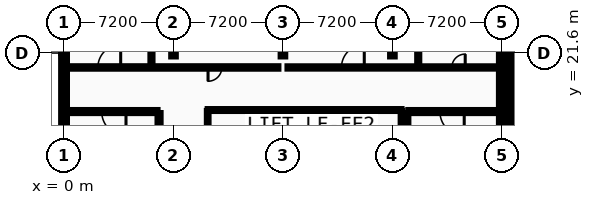
"""IFC4 building model, lengths in metres.
Left out: names, types, materials, properties, quantities, classifications, styles, units other than length and angle.
Written with IfcOpenShell. Run it as: python <this file> out.ifc"""

import sys

from ifc_helpers import new_model, si_unit, direction, frame, frame_2d, origin, origin_2d, place, context, subcontext, project, spatial, rectangle, i_section, extrude, element, fill, save


model = new_model("IFC4")
c1 = context("Model", 3, precision=1e-05, world=origin(), true_north=direction((0.0, 1.0)))
c2 = subcontext(c1, "Body", "Model", "MODEL_VIEW")
j1 = project(units=[si_unit("LENGTHUNIT", "METRE"), si_unit("PLANEANGLEUNIT", "RADIAN")], contexts=[c1])
p1 = place(None, origin())
s1 = spatial("IfcSite", under=j1, at=p1, CompositionType="ELEMENT")
p2 = place(p1, origin())
s2 = spatial("IfcBuilding", under=s1, at=p2, CompositionType="ELEMENT")
p3 = place(p2, frame((0.0, 0.0, 9.6)))
s3 = spatial("IfcBuildingStorey", under=s2, at=p3, CompositionType="ELEMENT", Elevation=9.6)
for number, where, z_axis, x_axis in (
    (1, (0.0, 21.6, 0.0), (0.0, 0.0, 1.0), (1.0, 0.0, 0.0)),
    (2, (7.2, 21.6, 0.0), (0.0, 0.0, 1.0), (1.0, 0.0, 0.0)),
    (3, (14.4, 21.6, 0.0), (0.0, 0.0, 1.0), (1.0, 0.0, 0.0)),
    (4, (21.6, 21.6, 0.0), (0.0, 0.0, 1.0), (1.0, 0.0, 0.0)),
    (5, (28.8, 21.6, 0.0), (0.0, 0.0, 1.0), (1.0, 0.0, 0.0)),
):
    element("IfcColumn", number, at=place(p3, frame(where, z_axis=z_axis, x_axis=x_axis)), inside=s3, PredefinedType="COLUMN", context=c2, shape_type="SweptSolid", body=[
        extrude(i_section(OverallWidth=0.3, OverallDepth=0.45, WebThickness=0.014, FlangeThickness=0.026, FilletRadius=0.027, at=origin_2d()), origin(), (0.0, 0.0, 1.0), 4.4),
    ])
p4 = place(p3, frame((29.52, 21.6, 0.0), z_axis=(0.0, 0.0, 1.0), x_axis=(1.0, 0.0, 0.0)))
e6 = element("IfcColumn", 6, at=p4, inside=s3, PredefinedType="COLUMN", context=c2, shape_type="SweptSolid", body=[
    extrude(i_section(OverallWidth=0.3, OverallDepth=0.36, WebThickness=0.012, FlangeThickness=0.022, FilletRadius=0.027, at=origin_2d()), origin(), (0.0, 0.0, 1.0), 4.4),
])
p5 = place(p3, frame((0.0, 21.6, 0.0), z_axis=(0.0, 0.0, 1.0), x_axis=(0.0, -1.0, 0.0)))
e7 = element("IfcWall", 7, at=p5, inside=s3, PredefinedType="STANDARD", context=c2, shape_type="SweptSolid", body=[
    extrude(rectangle(XDim=7.15, YDim=0.38, at=frame_2d((3.575, 0.0))), origin(), (0.0, 0.0, 1.0), 4.2),
])
p6 = place(p5, frame((1.715, 0.0, 0.95)))
e8 = element("IfcOpeningElement", 8, at=p6, cuts=e7, PredefinedType="OPENING", context=c2, shape_type="SweptSolid", body=[
    extrude(rectangle(XDim=0.86, YDim=1.332, at=frame_2d((0.43, 0.666))), frame((0.0, 0.2, 0.0), z_axis=(0.0, -1.0, 0.0), x_axis=(1.0, 0.0, 0.0)), (0.0, 0.0, 1.0), 0.4),
])
p7 = place(p5, frame((4.575, 0.0, 0.95)))
e9 = element("IfcOpeningElement", 9, at=p7, cuts=e7, PredefinedType="OPENING", context=c2, shape_type="SweptSolid", body=[
    extrude(rectangle(XDim=0.86, YDim=1.332, at=frame_2d((0.43, 0.666))), frame((0.0, 0.2, 0.0), z_axis=(0.0, -1.0, 0.0), x_axis=(1.0, 0.0, 0.0)), (0.0, 0.0, 1.0), 0.4),
])
p8 = place(p3, frame((0.0, 28.8, 0.0), z_axis=(0.0, 0.0, 1.0), x_axis=(0.0, -1.0, 0.0)))
e10 = element("IfcWall", 10, at=p8, inside=s3, PredefinedType="STANDARD", context=c2, shape_type="SweptSolid", body=[
    extrude(rectangle(XDim=7.2, YDim=0.38, at=frame_2d((3.6, 0.0))), origin(), (0.0, 0.0, 1.0), 3.885),
])
p9 = place(p8, frame((1.713, 0.0, 0.95)))
e11 = element("IfcOpeningElement", 11, at=p9, cuts=e10, PredefinedType="OPENING", context=c2, shape_type="SweptSolid", body=[
    extrude(rectangle(XDim=0.894, YDim=1.332, at=frame_2d((0.447, 0.666))), frame((0.0, 0.2, 0.0), z_axis=(0.0, -1.0, 0.0), x_axis=(1.0, 0.0, 0.0)), (0.0, 0.0, 1.0), 0.4),
])
p10 = place(p8, frame((4.593, 0.0, 0.95)))
e12 = element("IfcOpeningElement", 12, at=p10, cuts=e10, PredefinedType="OPENING", context=c2, shape_type="SweptSolid", body=[
    extrude(rectangle(XDim=0.894, YDim=1.332, at=frame_2d((0.447, 0.666))), frame((0.0, 0.2, 0.0), z_axis=(0.0, -1.0, 0.0), x_axis=(1.0, 0.0, 0.0)), (0.0, 0.0, 1.0), 0.4),
])
p11 = place(p3, frame((28.8, 14.45, 0.0), z_axis=(0.0, 0.0, 1.0), x_axis=(0.0, 1.0, 0.0)))
e13 = element("IfcWall", 13, at=p11, inside=s3, PredefinedType="STANDARD", context=c2, shape_type="SweptSolid", body=[
    extrude(rectangle(XDim=7.15, YDim=0.38, at=frame_2d((3.575, 0.0))), origin(), (0.0, 0.0, 1.0), 4.2),
])
p12 = place(p11, frame((1.613, 0.0, 0.95)))
e14 = element("IfcOpeningElement", 14, at=p12, cuts=e13, PredefinedType="OPENING", context=c2, shape_type="SweptSolid", body=[
    extrude(rectangle(XDim=1.064, YDim=1.332, at=frame_2d((0.532, 0.666))), frame((0.0, 0.2, 0.0), z_axis=(0.0, -1.0, 0.0), x_axis=(1.0, 0.0, 0.0)), (0.0, 0.0, 1.0), 0.4),
])
p13 = place(p11, frame((4.473, 0.0, 0.95)))
e15 = element("IfcOpeningElement", 15, at=p13, cuts=e13, PredefinedType="OPENING", context=c2, shape_type="SweptSolid", body=[
    extrude(rectangle(XDim=1.064, YDim=1.332, at=frame_2d((0.532, 0.666))), frame((0.0, 0.2, 0.0), z_axis=(0.0, -1.0, 0.0), x_axis=(1.0, 0.0, 0.0)), (0.0, 0.0, 1.0), 0.4),
])
p14 = place(p3, frame((29.52, 21.6, 0.0), z_axis=(0.0, 0.0, 1.0), x_axis=(0.0, -1.0, 0.0)))
e16 = element("IfcWall", 16, at=p14, inside=s3, PredefinedType="STANDARD", context=c2, shape_type="SweptSolid", body=[
    extrude(rectangle(XDim=7.2, YDim=0.38, at=frame_2d((3.6, 0.0))), origin(), (0.0, 0.0, 1.0), 3.895),
])
p15 = place(p14, frame((1.662, 0.0, 0.95)))
e17 = element("IfcOpeningElement", 17, at=p15, cuts=e16, PredefinedType="OPENING", context=c2, shape_type="SweptSolid", body=[
    extrude(rectangle(XDim=0.996, YDim=1.368, at=frame_2d((0.498, 0.684))), frame((0.0, 0.2, 0.0), z_axis=(0.0, -1.0, 0.0), x_axis=(1.0, 0.0, 0.0)), (0.0, 0.0, 1.0), 0.4),
])
p16 = place(p14, frame((4.542, 0.0, 0.95)))
e18 = element("IfcOpeningElement", 18, at=p16, cuts=e16, PredefinedType="OPENING", context=c2, shape_type="SweptSolid", body=[
    extrude(rectangle(XDim=0.996, YDim=1.368, at=frame_2d((0.498, 0.684))), frame((0.0, 0.2, 0.0), z_axis=(0.0, -1.0, 0.0), x_axis=(1.0, 0.0, 0.0)), (0.0, 0.0, 1.0), 0.4),
])
p17 = place(p3, frame((29.52, 28.99, 0.0), z_axis=(0.0, 0.0, 1.0), x_axis=(0.0, -1.0, 0.0)))
e19 = element("IfcWall", 19, at=p17, inside=s3, PredefinedType="STANDARD", context=c2, shape_type="SweptSolid", body=[
    extrude(rectangle(XDim=7.39, YDim=0.38, at=frame_2d((3.695, 0.0))), origin(), (0.0, 0.0, 1.0), 3.9),
])
p18 = place(p17, frame((1.702, 0.0, 0.95)))
e20 = element("IfcOpeningElement", 20, at=p18, cuts=e19, PredefinedType="OPENING", context=c2, shape_type="SweptSolid", body=[
    extrude(rectangle(XDim=1.03, YDim=1.368, at=frame_2d((0.515, 0.684))), frame((0.0, 0.2, 0.0), z_axis=(0.0, -1.0, 0.0), x_axis=(1.0, 0.0, 0.0)), (0.0, 0.0, 1.0), 0.4),
])
p19 = place(p17, frame((4.658, 0.0, 0.95)))
e21 = element("IfcOpeningElement", 21, at=p19, cuts=e19, PredefinedType="OPENING", context=c2, shape_type="SweptSolid", body=[
    extrude(rectangle(XDim=1.03, YDim=1.368, at=frame_2d((0.515, 0.684))), frame((0.0, 0.2, 0.0), z_axis=(0.0, -1.0, 0.0), x_axis=(1.0, 0.0, 0.0)), (0.0, 0.0, 1.0), 0.4),
])
p20 = place(p3, frame((0.4, 17.75, 0.0), z_axis=(0.0, 0.0, 1.0), x_axis=(1.0, 0.0, 0.0)))
e22 = element("IfcWall", 22, at=p20, inside=s3, PredefinedType="PARTITIONING", context=c2, shape_type="SweptSolid", body=[
    extrude(rectangle(XDim=5.75, YDim=0.2, at=frame_2d((2.875, 0.0))), origin(), (0.0, 0.0, 1.0), 4.2),
])
p21 = place(p20, frame((2.075, 0.0, 0.0)))
e23 = element("IfcOpeningElement", 23, at=p21, cuts=e22, PredefinedType="OPENING", context=c2, shape_type="SweptSolid", body=[
    extrude(rectangle(XDim=1.6, YDim=2.2, at=frame_2d((0.8, 1.1))), frame((0.0, 0.11, 0.0), z_axis=(0.0, -1.0, 0.0), x_axis=(1.0, 0.0, 0.0)), (0.0, 0.0, 1.0), 0.22),
])
p22 = place(p3, frame((6.25, 14.45, 0.0), z_axis=(0.0, 0.0, 1.0), x_axis=(0.0, 1.0, 0.0)))
e24 = element("IfcWall", 24, at=p22, inside=s3, PredefinedType="PARTITIONING", context=c2, shape_type="SweptSolid", body=[
    extrude(rectangle(XDim=3.2, YDim=0.2, at=frame_2d((1.6, 0.0))), origin(), (0.0, 0.0, 1.0), 4.2),
])
p23 = place(p3, frame((22.65, 17.75, 0.0), z_axis=(0.0, 0.0, 1.0), x_axis=(1.0, 0.0, 0.0)))
e25 = element("IfcWall", 25, at=p23, inside=s3, PredefinedType="PARTITIONING", context=c2, shape_type="SweptSolid", body=[
    extrude(rectangle(XDim=5.75, YDim=0.2, at=frame_2d((2.875, 0.0))), origin(), (0.0, 0.0, 1.0), 4.2),
])
p24 = place(p23, frame((2.075, 0.0, 0.0)))
e26 = element("IfcOpeningElement", 26, at=p24, cuts=e25, PredefinedType="OPENING", context=c2, shape_type="SweptSolid", body=[
    extrude(rectangle(XDim=1.6, YDim=2.2, at=frame_2d((0.8, 1.1))), frame((0.0, 0.11, 0.0), z_axis=(0.0, -1.0, 0.0), x_axis=(1.0, 0.0, 0.0)), (0.0, 0.0, 1.0), 0.22),
])
p25 = place(p3, frame((22.55, 14.45, 0.0), z_axis=(0.0, 0.0, 1.0), x_axis=(0.0, 1.0, 0.0)))
e27 = element("IfcWall", 27, at=p25, inside=s3, PredefinedType="PARTITIONING", context=c2, shape_type="SweptSolid", body=[
    extrude(rectangle(XDim=3.2, YDim=0.2, at=frame_2d((1.6, 0.0))), origin(), (0.0, 0.0, 1.0), 4.2),
])
p26 = place(p3, frame((9.45, 17.85, 0.0), z_axis=(0.0, 0.0, 1.0), x_axis=(1.0, 0.0, 0.0)))
e28 = element("IfcWall", 28, at=p26, inside=s3, PredefinedType="PARTITIONING", context=c2, shape_type="SweptSolid", body=[
    extrude(rectangle(XDim=12.75, YDim=0.125, at=frame_2d((6.375, 0.0))), origin(), (0.0, 0.0, 1.0), 4.2),
])
p27 = place(p26, frame((0.45, 0.0, 0.0)))
e29 = element("IfcOpeningElement", 29, at=p27, cuts=e28, PredefinedType="OPENING", context=c2, shape_type="SweptSolid", body=[
    extrude(rectangle(XDim=1.0, YDim=2.1, at=frame_2d((0.5, 1.05))), frame((0.0, 0.073, 0.0), z_axis=(0.0, -1.0, 0.0), x_axis=(1.0, 0.0, 0.0)), (0.0, 0.0, 1.0), 0.145),
])
p28 = place(p26, frame((8.3, 0.0, 0.0)))
e30 = element("IfcOpeningElement", 30, at=p28, cuts=e28, PredefinedType="OPENING", context=c2, shape_type="SweptSolid", body=[
    extrude(rectangle(XDim=0.9, YDim=2.1, at=frame_2d((0.45, 1.05))), frame((0.0, 0.073, 0.0), z_axis=(0.0, -1.0, 0.0), x_axis=(1.0, 0.0, 0.0)), (0.0, 0.0, 1.0), 0.145),
])
p29 = place(p3, frame((0.2, 20.65, 0.0), z_axis=(0.0, 0.0, 1.0), x_axis=(1.0, 0.0, 0.0)))
e31 = element("IfcWall", 31, at=p29, inside=s3, PredefinedType="PARTITIONING", context=c2, shape_type="SweptSolid", body=[
    extrude(rectangle(XDim=13.9, YDim=0.16, at=frame_2d((6.95, 0.0))), origin(), (0.0, 0.0, 1.0), 4.2),
])
p30 = place(p29, frame((2.025, 0.0, 0.0)))
e32 = element("IfcOpeningElement", 32, at=p30, cuts=e31, PredefinedType="OPENING", context=c2, shape_type="SweptSolid", body=[
    extrude(rectangle(XDim=1.5, YDim=2.2, at=frame_2d((0.75, 1.1))), frame((0.0, 0.09, 0.0), z_axis=(0.0, -1.0, 0.0), x_axis=(1.0, 0.0, 0.0)), (0.0, 0.0, 1.0), 0.18),
])
p31 = place(p29, frame((9.272, 0.0, 0.0)))
e33 = element("IfcOpeningElement", 33, at=p31, cuts=e31, PredefinedType="OPENING", context=c2, shape_type="SweptSolid", body=[
    extrude(rectangle(XDim=0.906, YDim=2.152, at=frame_2d((0.453, 1.076))), frame((0.0, 0.09, 0.0), z_axis=(0.0, -1.0, 0.0), x_axis=(1.0, 0.0, 0.0)), (0.0, 0.0, 1.0), 0.18),
])
p32 = place(p3, frame((14.7, 20.65, 0.0), z_axis=(0.0, 0.0, 1.0), x_axis=(1.0, 0.0, 0.0)))
e34 = element("IfcWall", 34, at=p32, inside=s3, PredefinedType="PARTITIONING", context=c2, shape_type="SweptSolid", body=[
    extrude(rectangle(XDim=13.9, YDim=0.15, at=frame_2d((6.95, 0.0))), origin(), (0.0, 0.0, 1.0), 4.2),
])
p33 = place(p32, frame((10.81, 0.0, 0.0)))
e35 = element("IfcOpeningElement", 35, at=p33, cuts=e34, PredefinedType="OPENING", context=c2, shape_type="SweptSolid", body=[
    extrude(rectangle(XDim=0.88, YDim=2.152, at=frame_2d((0.44, 1.076))), frame((0.0, 0.085, 0.0), z_axis=(0.0, -1.0, 0.0), x_axis=(1.0, 0.0, 0.0)), (0.0, 0.0, 1.0), 0.17),
])
p34 = place(p32, frame((3.55, 0.0, 0.0)))
e36 = element("IfcOpeningElement", 36, at=p34, cuts=e34, PredefinedType="OPENING", context=c2, shape_type="SweptSolid", body=[
    extrude(rectangle(XDim=1.5, YDim=2.2, at=frame_2d((0.75, 1.1))), frame((0.0, 0.085, 0.0), z_axis=(0.0, -1.0, 0.0), x_axis=(1.0, 0.0, 0.0)), (0.0, 0.0, 1.0), 0.17),
])
p35 = place(p3, frame((5.75, 20.73, 0.0), z_axis=(0.0, 0.0, 1.0), x_axis=(0.0, 1.0, 0.0)))
e37 = element("IfcWall", 37, at=p35, inside=s3, PredefinedType="PARTITIONING", context=c2, shape_type="SweptSolid", body=[
    extrude(rectangle(XDim=29.47, YDim=0.135, at=frame_2d((14.735, 0.0))), origin(), (0.0, 0.0, 1.0), 4.2),
])
p36 = place(p3, frame((9.45, 3.36, 0.0), z_axis=(0.0, 0.0, 1.0), x_axis=(0.0, 1.0, 0.0)))
e38 = element("IfcWall", 38, at=p36, inside=s3, PredefinedType="PARTITIONING", context=c2, shape_type="SweptSolid", body=[
    extrude(rectangle(XDim=14.427, YDim=0.11, at=frame_2d((7.214, 0.0))), origin(), (0.0, 0.0, 1.0), 3.915),
])
p37 = place(p3, frame((14.2, 14.78, 0.0), z_axis=(0.0, 0.0, 1.0), x_axis=(0.0, 1.0, 0.0)))
e39 = element("IfcWall", 39, at=p37, inside=s3, PredefinedType="PARTITIONING", context=c2, shape_type="SweptSolid", body=[
    extrude(rectangle(XDim=3.008, YDim=0.11, at=frame_2d((1.504, 0.0))), origin(), (0.0, 0.0, 1.0), 3.895),
])
p38 = place(p3, frame((22.2, 14.65, 0.0), z_axis=(0.0, 0.0, 1.0), x_axis=(0.0, 1.0, 0.0)))
e40 = element("IfcWall", 40, at=p38, inside=s3, PredefinedType="PARTITIONING", context=c2, shape_type="SweptSolid", body=[
    extrude(rectangle(XDim=3.138, YDim=0.11, at=frame_2d((1.569, 0.0))), origin(), (0.0, 0.0, 1.0), 4.2),
])
p39 = place(p3, frame((23.3, 20.725, 0.0), z_axis=(0.0, 0.0, 1.0), x_axis=(0.0, 1.0, 0.0)))
e41 = element("IfcWall", 41, at=p39, inside=s3, PredefinedType="PARTITIONING", context=c2, shape_type="SweptSolid", body=[
    extrude(rectangle(XDim=29.475, YDim=0.135, at=frame_2d((14.737, 0.0))), origin(), (0.0, 0.0, 1.0), 4.2),
])
p40 = place(p6, origin())
e42 = element("IfcWindow", 42, at=p40, inside=s3, PartitioningType="SINGLE_PANEL", PredefinedType="WINDOW", context=c2, shape_type="SweptSolid", body=[
    extrude(rectangle(XDim=0.86, YDim=1.332, at=frame_2d((0.43, 0.666))), frame((0.0, 0.03, 0.0), z_axis=(0.0, -1.0, 0.0), x_axis=(1.0, 0.0, 0.0)), (0.0, 0.0, 1.0), 0.06),
])
fill(e8, e42)
p41 = place(p7, origin())
e43 = element("IfcWindow", 43, at=p41, inside=s3, PartitioningType="SINGLE_PANEL", PredefinedType="WINDOW", context=c2, shape_type="SweptSolid", body=[
    extrude(rectangle(XDim=0.86, YDim=1.332, at=frame_2d((0.43, 0.666))), frame((0.0, 0.03, 0.0), z_axis=(0.0, -1.0, 0.0), x_axis=(1.0, 0.0, 0.0)), (0.0, 0.0, 1.0), 0.06),
])
fill(e9, e43)
p42 = place(p12, origin())
e44 = element("IfcWindow", 44, at=p42, inside=s3, PartitioningType="SINGLE_PANEL", PredefinedType="WINDOW", context=c2, shape_type="SweptSolid", body=[
    extrude(rectangle(XDim=1.064, YDim=1.332, at=frame_2d((0.532, 0.666))), frame((0.0, 0.03, 0.0), z_axis=(0.0, -1.0, 0.0), x_axis=(1.0, 0.0, 0.0)), (0.0, 0.0, 1.0), 0.06),
])
fill(e14, e44)
p43 = place(p13, origin())
e45 = element("IfcWindow", 45, at=p43, inside=s3, PartitioningType="SINGLE_PANEL", PredefinedType="WINDOW", context=c2, shape_type="SweptSolid", body=[
    extrude(rectangle(XDim=1.064, YDim=1.332, at=frame_2d((0.532, 0.666))), frame((0.0, 0.03, 0.0), z_axis=(0.0, -1.0, 0.0), x_axis=(1.0, 0.0, 0.0)), (0.0, 0.0, 1.0), 0.06),
])
fill(e15, e45)
p44 = place(p15, origin())
e46 = element("IfcWindow", 46, at=p44, inside=s3, PartitioningType="SINGLE_PANEL", PredefinedType="WINDOW", context=c2, shape_type="SweptSolid", body=[
    extrude(rectangle(XDim=0.996, YDim=1.368, at=frame_2d((0.498, 0.684))), frame((0.0, 0.03, 0.0), z_axis=(0.0, -1.0, 0.0), x_axis=(1.0, 0.0, 0.0)), (0.0, 0.0, 1.0), 0.06),
])
fill(e17, e46)
p45 = place(p16, origin())
e47 = element("IfcWindow", 47, at=p45, inside=s3, PartitioningType="SINGLE_PANEL", PredefinedType="WINDOW", context=c2, shape_type="SweptSolid", body=[
    extrude(rectangle(XDim=0.996, YDim=1.368, at=frame_2d((0.498, 0.684))), frame((0.0, 0.03, 0.0), z_axis=(0.0, -1.0, 0.0), x_axis=(1.0, 0.0, 0.0)), (0.0, 0.0, 1.0), 0.06),
])
fill(e18, e47)
p46 = place(p21, origin())
e48 = element("IfcDoor", 48, at=p46, inside=s3, OperationType="DOUBLE_DOOR_SINGLE_SWING", PredefinedType="DOOR", context=c2, shape_type="SweptSolid", body=[
    extrude(rectangle(XDim=1.6, YDim=2.2, at=frame_2d((0.8, 1.1))), frame((0.0, 0.025, 0.0), z_axis=(0.0, -1.0, 0.0), x_axis=(1.0, 0.0, 0.0)), (0.0, 0.0, 1.0), 0.05),
])
fill(e23, e48)
p47 = place(p24, origin())
e49 = element("IfcDoor", 49, at=p47, inside=s3, OperationType="DOUBLE_DOOR_SINGLE_SWING", PredefinedType="DOOR", context=c2, shape_type="SweptSolid", body=[
    extrude(rectangle(XDim=1.6, YDim=2.2, at=frame_2d((0.8, 1.1))), frame((0.0, 0.025, 0.0), z_axis=(0.0, -1.0, 0.0), x_axis=(1.0, 0.0, 0.0)), (0.0, 0.0, 1.0), 0.05),
])
fill(e26, e49)
p48 = place(p27, origin())
e50 = element("IfcDoor", 50, at=p48, inside=s3, OperationType="SLIDING_TO_LEFT", PredefinedType="DOOR", context=c2, shape_type="SweptSolid", body=[
    extrude(rectangle(XDim=1.0, YDim=2.1, at=frame_2d((0.5, 1.05))), frame((0.0, 0.025, 0.0), z_axis=(0.0, -1.0, 0.0), x_axis=(1.0, 0.0, 0.0)), (0.0, 0.0, 1.0), 0.05),
])
fill(e29, e50)
p49 = place(p28, origin())
e51 = element("IfcDoor", 51, at=p49, inside=s3, OperationType="SINGLE_SWING_RIGHT", PredefinedType="DOOR", context=c2, shape_type="SweptSolid", body=[
    extrude(rectangle(XDim=0.9, YDim=2.1, at=frame_2d((0.45, 1.05))), frame((0.0, 0.025, 0.0), z_axis=(0.0, -1.0, 0.0), x_axis=(1.0, 0.0, 0.0)), (0.0, 0.0, 1.0), 0.05),
])
fill(e30, e51)
p50 = place(p33, frame((0.88, 0.0, 0.0), z_axis=(0.0, 0.0, 1.0), x_axis=(-1.0, 0.0, 0.0)))
e52 = element("IfcDoor", 52, at=p50, inside=s3, OperationType="SINGLE_SWING_RIGHT", PredefinedType="DOOR", context=c2, shape_type="SweptSolid", body=[
    extrude(rectangle(XDim=0.88, YDim=2.152, at=frame_2d((0.44, 1.076))), frame((0.0, 0.025, 0.0), z_axis=(0.0, -1.0, 0.0), x_axis=(1.0, 0.0, 0.0)), (0.0, 0.0, 1.0), 0.05),
])
fill(e35, e52)
p51 = place(p30, frame((1.5, 0.0, 0.0), z_axis=(0.0, 0.0, 1.0), x_axis=(-1.0, 0.0, 0.0)))
e53 = element("IfcDoor", 53, at=p51, inside=s3, OperationType="DOUBLE_DOOR_SINGLE_SWING", PredefinedType="DOOR", context=c2, shape_type="SweptSolid", body=[
    extrude(rectangle(XDim=1.5, YDim=2.2, at=frame_2d((0.75, 1.1))), frame((0.0, 0.025, 0.0), z_axis=(0.0, -1.0, 0.0), x_axis=(1.0, 0.0, 0.0)), (0.0, 0.0, 1.0), 0.05),
])
fill(e32, e53)
p52 = place(p31, frame((0.906, 0.0, 0.0), z_axis=(0.0, 0.0, 1.0), x_axis=(-1.0, 0.0, 0.0)))
e54 = element("IfcDoor", 54, at=p52, inside=s3, OperationType="SINGLE_SWING_LEFT", PredefinedType="DOOR", context=c2, shape_type="SweptSolid", body=[
    extrude(rectangle(XDim=0.906, YDim=2.152, at=frame_2d((0.453, 1.076))), frame((0.0, 0.025, 0.0), z_axis=(0.0, -1.0, 0.0), x_axis=(1.0, 0.0, 0.0)), (0.0, 0.0, 1.0), 0.05),
])
fill(e33, e54)
p53 = place(p34, frame((1.5, 0.0, 0.0), z_axis=(0.0, 0.0, 1.0), x_axis=(-1.0, 0.0, 0.0)))
e55 = element("IfcDoor", 55, at=p53, inside=s3, OperationType="DOUBLE_DOOR_SINGLE_SWING", PredefinedType="DOOR", context=c2, shape_type="SweptSolid", body=[
    extrude(rectangle(XDim=1.5, YDim=2.2, at=frame_2d((0.75, 1.1))), frame((0.0, 0.025, 0.0), z_axis=(0.0, -1.0, 0.0), x_axis=(1.0, 0.0, 0.0)), (0.0, 0.0, 1.0), 0.05),
])
fill(e36, e55)
save(model, sys.argv[1])
